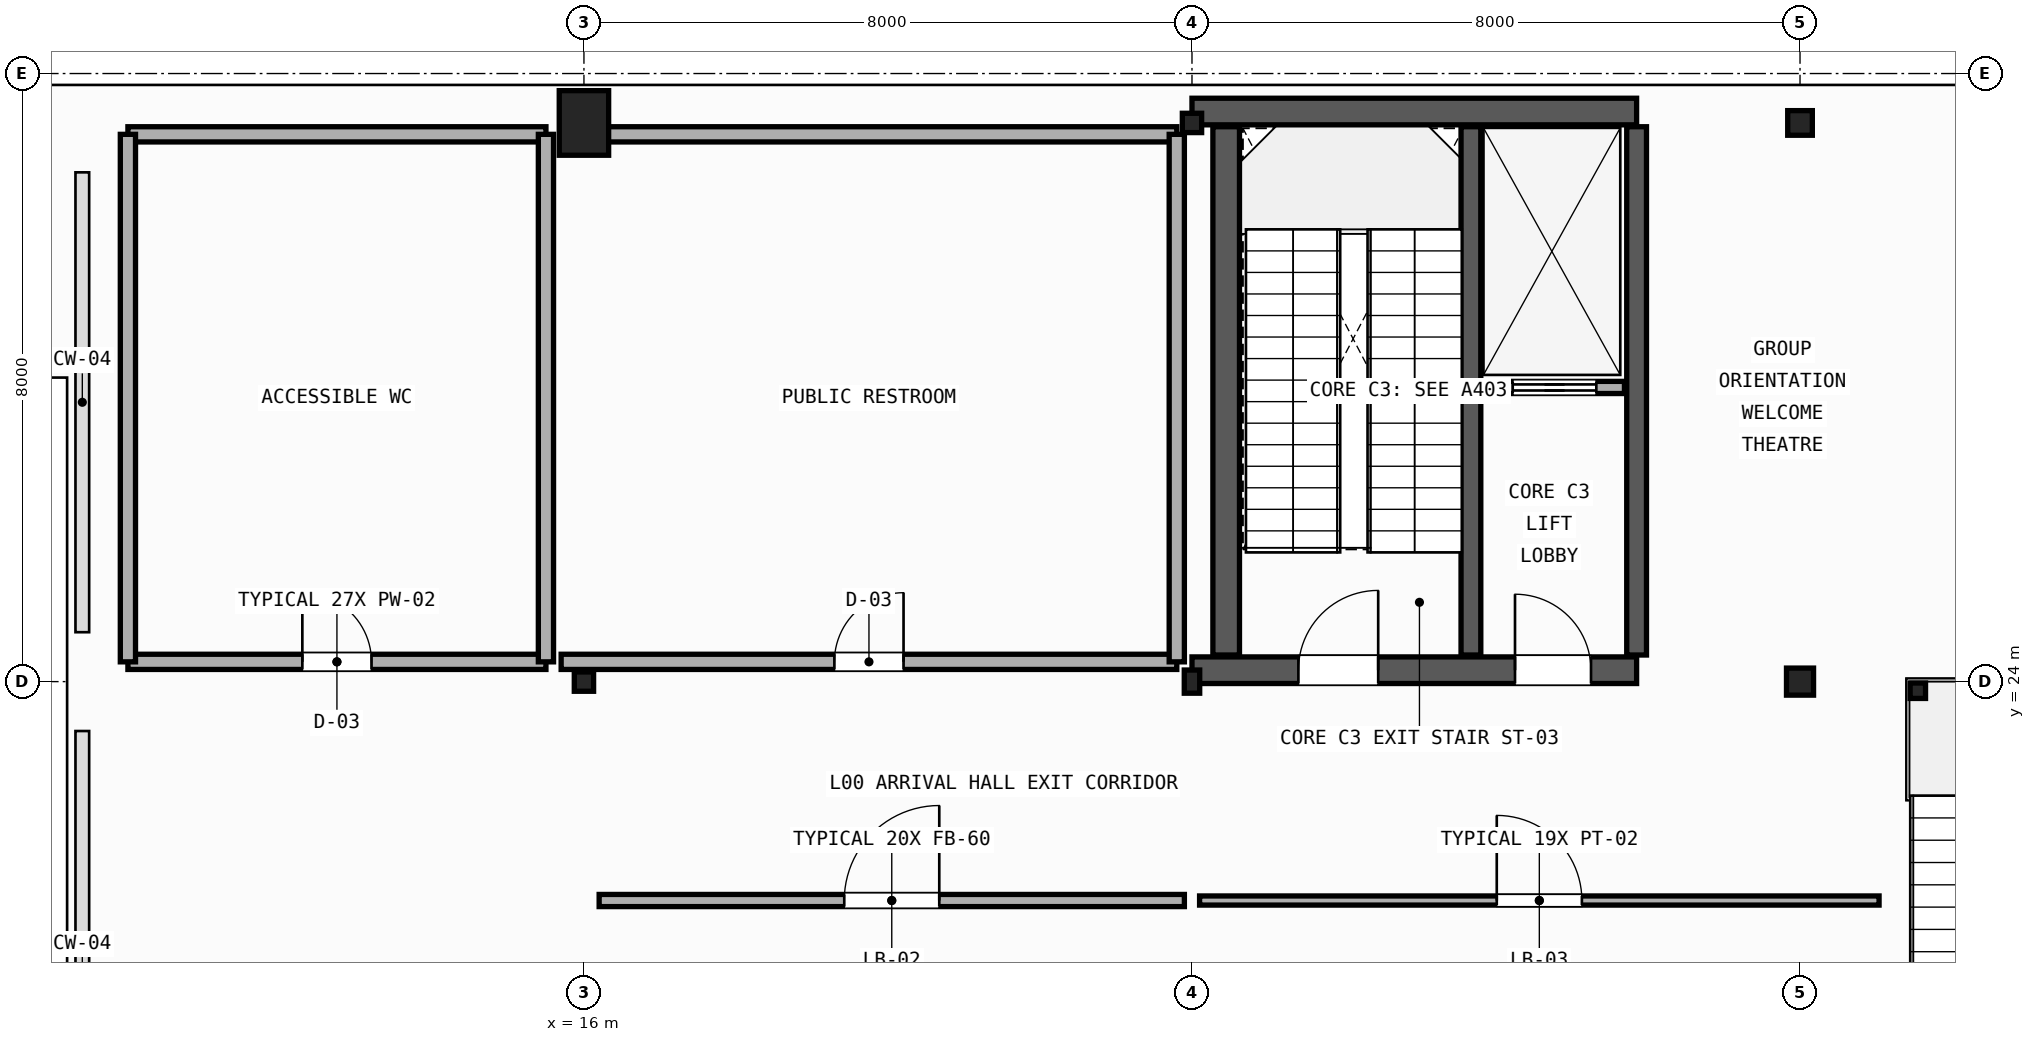
"""IFC4 building model, lengths in metres.
Left out: names, types, materials, properties, quantities, classifications, styles, units other than length and angle.
Written with IfcOpenShell. Run it as: python <this file> out.ifc"""

import sys

from ifc_helpers import new_model, si_unit, direction, frame, frame_2d, origin, origin_2d, place, context, subcontext, project, spatial, rectangle, hollow_rectangle, hollow_circle, i_section, extrude, element, fill, save


model = new_model("IFC4")
c1 = context("Model", 3, precision=1e-05, world=origin(), true_north=direction((0.0, 1.0)))
c2 = subcontext(c1, "Body", "Model", "MODEL_VIEW")
j1 = project(units=[si_unit("LENGTHUNIT", "METRE"), si_unit("PLANEANGLEUNIT", "RADIAN")], contexts=[c1])
p1 = place(None, origin())
s1 = spatial("IfcSite", under=j1, at=p1, CompositionType="ELEMENT")
p2 = place(p1, origin())
s2 = spatial("IfcBuilding", under=s1, at=p2, CompositionType="ELEMENT")
p3 = place(p2, origin())
s3 = spatial("IfcBuildingStorey", under=s2, at=p3, CompositionType="ELEMENT", Elevation=0.0)
p4 = place(p3, frame((16.0, 24.0, 0.0), z_axis=(0.0, 0.0, 1.0), x_axis=(0.0, 1.0, 0.0)))
e1 = element("IfcColumn", 1, at=p4, inside=s3, PredefinedType="COLUMN", context=c2, shape_type="SweptSolid", body=[
    extrude(i_section(OverallWidth=0.254, OverallDepth=0.254, WebThickness=0.009, FlangeThickness=0.014, FilletRadius=0.011, at=origin_2d()), origin(), (0.0, 0.0, 1.0), 5.12),
])
p5 = place(p3, frame((16.0, 31.35, 0.0), z_axis=(0.0, 0.0, 1.0), x_axis=(1.0, 0.0, 0.0)))
e2 = element("IfcColumn", 2, at=p5, inside=s3, PredefinedType="PILASTER", context=c2, shape_type="SweptSolid", body=[
    extrude(rectangle(XDim=0.65, YDim=0.85, at=origin_2d()), origin(), (0.0, 0.0, 1.0), 5.12),
])
p6 = place(p3, frame((24.0, 24.0, 0.0), z_axis=(0.0, 0.0, 1.0), x_axis=(1.0, 0.0, 0.0)))
e3 = element("IfcColumn", 3, at=p6, inside=s3, PredefinedType="COLUMN", context=c2, shape_type="SweptSolid", body=[
    extrude(hollow_rectangle(XDim=0.203, YDim=0.305, WallThickness=0.009, InnerFilletRadius=0.009, OuterFilletRadius=0.018, at=origin_2d()), origin(), (0.0, 0.0, 1.0), 5.12),
])
p7 = place(p3, frame((24.0, 31.35, 0.0), z_axis=(0.0, 0.0, 1.0), x_axis=(0.0, 1.0, 0.0)))
e4 = element("IfcColumn", 4, at=p7, inside=s3, PredefinedType="COLUMN", context=c2, shape_type="SweptSolid", body=[
    extrude(hollow_rectangle(XDim=0.254, YDim=0.254, WallThickness=0.012, InnerFilletRadius=0.012, OuterFilletRadius=0.024, at=origin_2d()), origin(), (0.0, 0.0, 1.0), 5.12),
])
p8 = place(p3, frame((32.0, 24.0, 0.0), z_axis=(0.0, 0.0, 1.0), x_axis=(0.0, 1.0, 0.0)))
e5 = element("IfcColumn", 5, at=p8, inside=s3, PredefinedType="COLUMN", context=c2, shape_type="SweptSolid", body=[
    extrude(hollow_circle(Radius=0.178, WallThickness=0.012, at=origin_2d()), origin(), (0.0, 0.0, 1.0), 5.12),
])
p9 = place(p3, frame((32.0, 31.35, 0.0), z_axis=(0.0, 0.0, 1.0), x_axis=(1.0, 0.0, 0.0)))
e6 = element("IfcColumn", 6, at=p9, inside=s3, PredefinedType="COLUMN", context=c2, shape_type="SweptSolid", body=[
    extrude(hollow_circle(Radius=0.162, WallThickness=0.012, at=origin_2d()), origin(), (0.0, 0.0, 1.0), 5.12),
])
p10 = place(p3, frame((24.0, 24.15, 0.0), z_axis=(0.0, 0.0, 1.0), x_axis=(1.0, 0.0, 0.0)))
e7 = element("IfcWall", 7, at=p10, inside=s3, PredefinedType="SHEAR", context=c2, shape_type="SweptSolid", body=[
    extrude(rectangle(XDim=5.85, YDim=0.35, at=frame_2d((2.925, 0.0))), origin(), (0.0, 0.0, 1.0), 5.11),
])
p11 = place(p10, frame((1.4, 0.0, 0.0)))
e8 = element("IfcOpeningElement", 8, at=p11, cuts=e7, PredefinedType="OPENING", context=c2, shape_type="SweptSolid", body=[
    extrude(rectangle(XDim=1.05, YDim=2.1, at=frame_2d((0.525, 1.05))), frame((0.0, 0.185, 0.0), z_axis=(0.0, -1.0, 0.0), x_axis=(1.0, 0.0, 0.0)), (0.0, 0.0, 1.0), 0.37),
])
p12 = place(p10, frame((4.25, 0.0, 0.0)))
e9 = element("IfcOpeningElement", 9, at=p12, cuts=e7, PredefinedType="OPENING", context=c2, shape_type="SweptSolid", body=[
    extrude(rectangle(XDim=1.0, YDim=2.15, at=frame_2d((0.5, 1.075))), frame((0.0, 0.185, 0.0), z_axis=(0.0, -1.0, 0.0), x_axis=(1.0, 0.0, 0.0)), (0.0, 0.0, 1.0), 0.37),
])
p13 = place(p3, frame((24.0, 31.5, 0.0), z_axis=(0.0, 0.0, 1.0), x_axis=(1.0, 0.0, 0.0)))
e10 = element("IfcWall", 10, at=p13, inside=s3, PredefinedType="SHEAR", context=c2, shape_type="SweptSolid", body=[
    extrude(rectangle(XDim=5.85, YDim=0.35, at=frame_2d((2.925, 0.0))), origin(), (0.0, 0.0, 1.0), 5.11),
])
p14 = place(p3, frame((24.45, 24.35, 0.0), z_axis=(0.0, 0.0, 1.0), x_axis=(0.0, 1.0, 0.0)))
e11 = element("IfcWall", 11, at=p14, inside=s3, PredefinedType="SHEAR", context=c2, shape_type="SweptSolid", body=[
    extrude(rectangle(XDim=6.95, YDim=0.35, at=frame_2d((3.475, 0.0))), origin(), (0.0, 0.0, 1.0), 5.11),
])
for number, where, z_axis, x_axis in (
    (12, (29.85, 24.35, 0.0), (0.0, 0.0, 1.0), (0.0, 1.0, 0.0)),
    (13, (27.67, 24.35, 0.0), (0.0, 0.0, 1.0), (0.0, 1.0, 0.0)),
):
    element("IfcWall", number, at=place(p3, frame(where, z_axis=z_axis, x_axis=x_axis)), inside=s3, PredefinedType="SHEAR", context=c2, shape_type="SweptSolid", body=[
        extrude(rectangle(XDim=6.95, YDim=0.26, at=frame_2d((3.475, 0.0))), origin(), (0.0, 0.0, 1.0), 5.11),
    ])
p15 = place(p3, frame((27.85, 27.87, 0.0), z_axis=(0.0, 0.0, 1.0), x_axis=(1.0, 0.0, 0.0)))
e14 = element("IfcWall", 14, at=p15, inside=s3, PredefinedType="PARTITIONING", context=c2, shape_type="SweptSolid", body=[
    extrude(rectangle(XDim=1.84, YDim=0.16, at=frame_2d((0.92, 0.0))), origin(), (0.0, 0.0, 1.0), 3.6),
])
p16 = place(p15, frame((0.37, 0.0, 0.0)))
e15 = element("IfcOpeningElement", 15, at=p16, cuts=e14, PredefinedType="OPENING", context=c2, shape_type="SweptSolid", body=[
    extrude(rectangle(XDim=1.1, YDim=2.15, at=frame_2d((0.55, 1.075))), frame((0.0, 0.09, 0.0), z_axis=(0.0, -1.0, 0.0), x_axis=(1.0, 0.0, 0.0)), (0.0, 0.0, 1.0), 0.18),
])
p17 = place(p3, frame((33.55, 23.88, 0.0), z_axis=(0.0, 0.0, 1.0), x_axis=(1.0, 0.0, 0.0)))
e16 = element("IfcColumn", 16, at=p17, inside=s3, PredefinedType="COLUMN", context=c2, shape_type="SweptSolid", body=[
    extrude(hollow_rectangle(XDim=0.203, YDim=0.203, WallThickness=0.009, InnerFilletRadius=0.009, OuterFilletRadius=0.018, at=origin_2d()), origin(), (0.0, 0.0, 1.0), 2.52),
])
p18 = place(p3, frame((16.2, 21.12, 0.0), z_axis=(0.0, 0.0, 1.0), x_axis=(1.0, 0.0, 0.0)))
e17 = element("IfcWall", 17, at=p18, inside=s3, PredefinedType="PARTITIONING", context=c2, shape_type="SweptSolid", body=[
    extrude(rectangle(XDim=7.7, YDim=0.16, at=frame_2d((3.85, 0.0))), origin(), (0.0, 0.0, 1.0), 4.29),
])
p19 = place(p18, frame((3.225, 0.0, 0.0)))
e18 = element("IfcOpeningElement", 18, at=p19, cuts=e17, PredefinedType="OPENING", context=c2, shape_type="SweptSolid", body=[
    extrude(rectangle(XDim=1.25, YDim=2.2, at=frame_2d((0.625, 1.1))), frame((0.0, 0.09, 0.0), z_axis=(0.0, -1.0, 0.0), x_axis=(1.0, 0.0, 0.0)), (0.0, 0.0, 1.0), 0.18),
])
p20 = place(p3, frame((24.1, 21.12, 0.0), z_axis=(0.0, 0.0, 1.0), x_axis=(1.0, 0.0, 0.0)))
e19 = element("IfcWall", 19, at=p20, inside=s3, PredefinedType="PARTITIONING", context=c2, shape_type="SweptSolid", body=[
    extrude(rectangle(XDim=8.94, YDim=0.12, at=frame_2d((4.47, 0.0))), origin(), (0.0, 0.0, 1.0), 4.29),
])
p21 = place(p20, frame((3.91, 0.0, 0.0)))
e20 = element("IfcOpeningElement", 20, at=p21, cuts=e19, PredefinedType="OPENING", context=c2, shape_type="SweptSolid", body=[
    extrude(rectangle(XDim=1.12, YDim=2.15, at=frame_2d((0.56, 1.075))), frame((0.0, 0.07, 0.0), z_axis=(0.0, -1.0, 0.0), x_axis=(1.0, 0.0, 0.0)), (0.0, 0.0, 1.0), 0.14),
])
p22 = place(p3, frame((10.0, 24.26, 0.0), z_axis=(0.0, 0.0, 1.0), x_axis=(1.0, 0.0, 0.0)))
e21 = element("IfcWall", 21, at=p22, inside=s3, PredefinedType="PLUMBINGWALL", context=c2, shape_type="SweptSolid", body=[
    extrude(rectangle(XDim=5.5, YDim=0.2, at=frame_2d((2.75, 0.0))), origin(), (0.0, 0.0, 1.0), 4.29),
])
p23 = place(p22, frame((2.295, 0.0, 0.0)))
e22 = element("IfcOpeningElement", 22, at=p23, cuts=e21, PredefinedType="OPENING", context=c2, shape_type="SweptSolid", body=[
    extrude(rectangle(XDim=0.91, YDim=2.1, at=frame_2d((0.455, 1.05))), frame((0.0, 0.11, 0.0), z_axis=(0.0, -1.0, 0.0), x_axis=(1.0, 0.0, 0.0)), (0.0, 0.0, 1.0), 0.22),
])
p24 = place(p3, frame((10.0, 31.2, 0.0), z_axis=(0.0, 0.0, 1.0), x_axis=(1.0, 0.0, 0.0)))
e23 = element("IfcWall", 23, at=p24, inside=s3, PredefinedType="PLUMBINGWALL", context=c2, shape_type="SweptSolid", body=[
    extrude(rectangle(XDim=5.5, YDim=0.2, at=frame_2d((2.75, 0.0))), origin(), (0.0, 0.0, 1.0), 4.28),
])
for number, where, z_axis, x_axis in (
    (24, (10.0, 24.26, 0.0), (0.0, 0.0, 1.0), (0.0, 1.0, 0.0)),
    (25, (15.5, 24.26, 0.0), (0.0, 0.0, 1.0), (0.0, 1.0, 0.0)),
):
    element("IfcWall", number, at=place(p3, frame(where, z_axis=z_axis, x_axis=x_axis)), inside=s3, PredefinedType="PLUMBINGWALL", context=c2, shape_type="SweptSolid", body=[
        extrude(rectangle(XDim=6.94, YDim=0.2, at=frame_2d((3.47, 0.0))), origin(), (0.0, 0.0, 1.0), 4.29),
    ])
p25 = place(p3, frame((15.7, 24.26, 0.0), z_axis=(0.0, 0.0, 1.0), x_axis=(1.0, 0.0, 0.0)))
e26 = element("IfcWall", 26, at=p25, inside=s3, PredefinedType="PLUMBINGWALL", context=c2, shape_type="SweptSolid", body=[
    extrude(rectangle(XDim=8.1, YDim=0.2, at=frame_2d((4.05, 0.0))), origin(), (0.0, 0.0, 1.0), 4.29),
])
p26 = place(p25, frame((3.595, 0.0, 0.0)))
e27 = element("IfcOpeningElement", 27, at=p26, cuts=e26, PredefinedType="OPENING", context=c2, shape_type="SweptSolid", body=[
    extrude(rectangle(XDim=0.91, YDim=2.1, at=frame_2d((0.455, 1.05))), frame((0.0, 0.11, 0.0), z_axis=(0.0, -1.0, 0.0), x_axis=(1.0, 0.0, 0.0)), (0.0, 0.0, 1.0), 0.22),
])
p27 = place(p3, frame((15.7, 31.2, 0.0), z_axis=(0.0, 0.0, 1.0), x_axis=(1.0, 0.0, 0.0)))
e28 = element("IfcWall", 28, at=p27, inside=s3, PredefinedType="PLUMBINGWALL", context=c2, shape_type="SweptSolid", body=[
    extrude(rectangle(XDim=8.1, YDim=0.2, at=frame_2d((4.05, 0.0))), origin(), (0.0, 0.0, 1.0), 4.28),
])
p28 = place(p3, frame((23.8, 24.26, 0.0), z_axis=(0.0, 0.0, 1.0), x_axis=(0.0, 1.0, 0.0)))
e29 = element("IfcWall", 29, at=p28, inside=s3, PredefinedType="PLUMBINGWALL", context=c2, shape_type="SweptSolid", body=[
    extrude(rectangle(XDim=6.94, YDim=0.2, at=frame_2d((3.47, 0.0))), origin(), (0.0, 0.0, 1.0), 4.29),
])
p29 = place(p16, origin())
e30 = element("IfcDoor", 30, at=p29, inside=s3, OperationType="SLIDING_TO_LEFT", PredefinedType="DOOR", context=c2, shape_type="SweptSolid", body=[
    extrude(rectangle(XDim=1.1, YDim=2.15, at=frame_2d((0.55, 1.075))), frame((0.0, 0.025, 0.0), z_axis=(0.0, -1.0, 0.0), x_axis=(1.0, 0.0, 0.0)), (0.0, 0.0, 1.0), 0.05),
])
fill(e15, e30)
p30 = place(p11, origin())
e31 = element("IfcDoor", 31, at=p30, inside=s3, OperationType="SINGLE_SWING_RIGHT", PredefinedType="DOOR", context=c2, shape_type="SweptSolid", body=[
    extrude(rectangle(XDim=1.05, YDim=2.1, at=frame_2d((0.525, 1.05))), frame((0.0, 0.025, 0.0), z_axis=(0.0, -1.0, 0.0), x_axis=(1.0, 0.0, 0.0)), (0.0, 0.0, 1.0), 0.05),
])
fill(e8, e31)
p31 = place(p12, origin())
e32 = element("IfcDoor", 32, at=p31, inside=s3, OperationType="SINGLE_SWING_LEFT", PredefinedType="DOOR", context=c2, shape_type="SweptSolid", body=[
    extrude(rectangle(XDim=1.0, YDim=2.15, at=frame_2d((0.5, 1.075))), frame((0.0, 0.025, 0.0), z_axis=(0.0, -1.0, 0.0), x_axis=(1.0, 0.0, 0.0)), (0.0, 0.0, 1.0), 0.05),
])
fill(e9, e32)
p32 = place(p19, origin())
e33 = element("IfcDoor", 33, at=p32, inside=s3, OperationType="SINGLE_SWING_RIGHT", PredefinedType="DOOR", context=c2, shape_type="SweptSolid", body=[
    extrude(rectangle(XDim=1.25, YDim=2.2, at=frame_2d((0.625, 1.1))), frame((0.0, 0.025, 0.0), z_axis=(0.0, -1.0, 0.0), x_axis=(1.0, 0.0, 0.0)), (0.0, 0.0, 1.0), 0.05),
])
fill(e18, e33)
p33 = place(p21, origin())
e34 = element("IfcDoor", 34, at=p33, inside=s3, OperationType="SINGLE_SWING_LEFT", PredefinedType="DOOR", context=c2, shape_type="SweptSolid", body=[
    extrude(rectangle(XDim=1.12, YDim=2.15, at=frame_2d((0.56, 1.075))), frame((0.0, 0.025, 0.0), z_axis=(0.0, -1.0, 0.0), x_axis=(1.0, 0.0, 0.0)), (0.0, 0.0, 1.0), 0.05),
])
fill(e20, e34)
p34 = place(p23, origin())
e35 = element("IfcDoor", 35, at=p34, inside=s3, OperationType="SINGLE_SWING_LEFT", PredefinedType="DOOR", context=c2, shape_type="SweptSolid", body=[
    extrude(rectangle(XDim=0.91, YDim=2.1, at=frame_2d((0.455, 1.05))), frame((0.0, 0.025, 0.0), z_axis=(0.0, -1.0, 0.0), x_axis=(1.0, 0.0, 0.0)), (0.0, 0.0, 1.0), 0.05),
])
fill(e22, e35)
p35 = place(p26, origin())
e36 = element("IfcDoor", 36, at=p35, inside=s3, OperationType="SINGLE_SWING_RIGHT", PredefinedType="DOOR", context=c2, shape_type="SweptSolid", body=[
    extrude(rectangle(XDim=0.91, YDim=2.1, at=frame_2d((0.455, 1.05))), frame((0.0, 0.025, 0.0), z_axis=(0.0, -1.0, 0.0), x_axis=(1.0, 0.0, 0.0)), (0.0, 0.0, 1.0), 0.05),
])
fill(e27, e36)
save(model, sys.argv[1])
